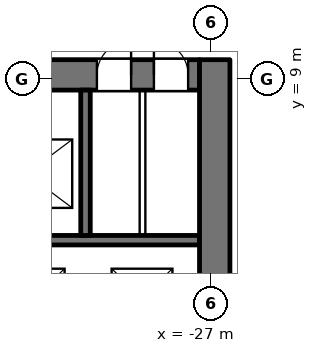
"""IFC4 building model, lengths in metres.
Left out: names, types, materials, properties, quantities, classifications, styles, units other than length and angle.
Written with IfcOpenShell. Run it as: python <this file> out.ifc"""

import sys

from ifc_helpers import new_model, si_unit, direction, frame, frame_2d, origin, place, context, subcontext, project, spatial, rectangle, extrude, element, fill, save


model = new_model("IFC4")
c1 = context("Model", 3, precision=1e-05, world=origin(), true_north=direction((0.0, 1.0)))
c2 = subcontext(c1, "Body", "Model", "MODEL_VIEW")
j1 = project(units=[si_unit("LENGTHUNIT", "METRE"), si_unit("PLANEANGLEUNIT", "RADIAN")], contexts=[c1])
p1 = place(None, origin())
s1 = spatial("IfcSite", under=j1, at=p1, CompositionType="ELEMENT")
p2 = place(p1, origin())
s2 = spatial("IfcBuilding", under=s1, at=p2, CompositionType="ELEMENT")
p3 = place(p2, frame((0.0, 0.0, 18.0)))
s3 = spatial("IfcBuildingStorey", under=s2, at=p3, CompositionType="ELEMENT", Elevation=18.0)
p4 = place(p3, frame((-44.7, 4.75, 0.0), z_axis=(0.0, 0.0, 1.0), x_axis=(1.0, 0.0, 0.0)))
e1 = element("IfcWall", 1, at=p4, inside=s3, PredefinedType="SHEAR", context=c2, shape_type="SweptSolid", body=[
    extrude(rectangle(XDim=17.4, YDim=0.25, at=frame_2d((8.7, 0.0))), origin(), (0.0, 0.0, 1.0), 4.5),
])
p5 = place(p3, frame((-44.7, 9.1, 0.0), z_axis=(0.0, 0.0, 1.0), x_axis=(1.0, 0.0, 0.0)))
e2 = element("IfcWall", 2, at=p5, inside=s3, PredefinedType="SHEAR", context=c2, shape_type="SweptSolid", body=[
    extrude(rectangle(XDim=17.4, YDim=0.8, at=frame_2d((8.7, 0.0))), origin(), (0.0, 0.0, 1.0), 4.5),
])
p6 = place(p5, frame((8.9, 0.0, 0.0)))
e3 = element("IfcOpeningElement", 3, at=p6, cuts=e2, PredefinedType="OPENING", context=c2, shape_type="SweptSolid", body=[
    extrude(rectangle(XDim=1.2, YDim=2.1, at=frame_2d((0.6, 1.05))), frame((0.0, 0.41, 0.0), z_axis=(0.0, -1.0, 0.0), x_axis=(1.0, 0.0, 0.0)), (0.0, 0.0, 1.0), 0.82),
])
p7 = place(p5, frame((14.7, 0.0, 0.0)))
e4 = element("IfcOpeningElement", 4, at=p7, cuts=e2, PredefinedType="OPENING", context=c2, shape_type="SweptSolid", body=[
    extrude(rectangle(XDim=0.9, YDim=2.1, at=frame_2d((0.45, 1.05))), frame((0.0, 0.41, 0.0), z_axis=(0.0, -1.0, 0.0), x_axis=(1.0, 0.0, 0.0)), (0.0, 0.0, 1.0), 0.82),
])
p8 = place(p5, frame((16.2, 0.0, 0.0)))
e5 = element("IfcOpeningElement", 5, at=p8, cuts=e2, PredefinedType="OPENING", context=c2, shape_type="SweptSolid", body=[
    extrude(rectangle(XDim=0.9, YDim=2.1, at=frame_2d((0.45, 1.05))), frame((0.0, 0.41, 0.0), z_axis=(0.0, -1.0, 0.0), x_axis=(1.0, 0.0, 0.0)), (0.0, 0.0, 1.0), 0.82),
])
p9 = place(p3, frame((-30.3, 4.875, 0.0), z_axis=(0.0, 0.0, 1.0), x_axis=(0.0, 1.0, 0.0)))
e6 = element("IfcWall", 6, at=p9, inside=s3, PredefinedType="SHEAR", context=c2, shape_type="SweptSolid", body=[
    extrude(rectangle(XDim=3.825, YDim=0.25, at=frame_2d((1.913, 0.0))), origin(), (0.0, 0.0, 1.0), 4.5),
])
p10 = place(p3, frame((-28.8, 4.875, 0.0), z_axis=(0.0, 0.0, 1.0), x_axis=(0.0, 1.0, 0.0)))
e7 = element("IfcWall", 7, at=p10, inside=s3, PredefinedType="PARTITIONING", context=c2, shape_type="SweptSolid", body=[
    extrude(rectangle(XDim=3.825, YDim=0.15, at=frame_2d((1.913, 0.0))), origin(), (0.0, 0.0, 1.0), 4.5),
])
p11 = place(p3, frame((-26.9, -9.5, 0.0), z_axis=(0.0, 0.0, 1.0), x_axis=(0.0, 1.0, 0.0)))
e8 = element("IfcWall", 8, at=p11, inside=s3, PredefinedType="SHEAR", context=c2, shape_type="SweptSolid", body=[
    extrude(rectangle(XDim=19.0, YDim=0.8, at=frame_2d((9.5, 0.0))), origin(), (0.0, 0.0, 1.0), 4.5),
])
p12 = place(p11, frame((8.3, 0.0, 0.0)))
e9 = element("IfcOpeningElement", 9, at=p12, cuts=e8, PredefinedType="OPENING", context=c2, shape_type="SweptSolid", body=[
    extrude(rectangle(XDim=2.4, YDim=2.1, at=frame_2d((1.2, 1.05))), frame((0.0, 0.41, 0.0), z_axis=(0.0, -1.0, 0.0), x_axis=(1.0, 0.0, 0.0)), (0.0, 0.0, 1.0), 0.82),
])
p13 = place(p7, origin())
e10 = element("IfcDoor", 10, at=p13, inside=s3, OperationType="SINGLE_SWING_RIGHT", PredefinedType="DOOR", context=c2, shape_type="SweptSolid", body=[
    extrude(rectangle(XDim=0.9, YDim=2.1, at=frame_2d((0.45, 1.05))), frame((0.0, -0.225, 0.0), z_axis=(0.0, -1.0, 0.0), x_axis=(1.0, 0.0, 0.0)), (0.0, 0.0, 1.0), 0.05),
])
fill(e4, e10)
p14 = place(p8, origin())
e11 = element("IfcDoor", 11, at=p14, inside=s3, OperationType="SINGLE_SWING_LEFT", PredefinedType="DOOR", context=c2, shape_type="SweptSolid", body=[
    extrude(rectangle(XDim=0.9, YDim=2.1, at=frame_2d((0.45, 1.05))), frame((0.0, -0.225, 0.0), z_axis=(0.0, -1.0, 0.0), x_axis=(1.0, 0.0, 0.0)), (0.0, 0.0, 1.0), 0.05),
])
fill(e5, e11)
save(model, sys.argv[1])
